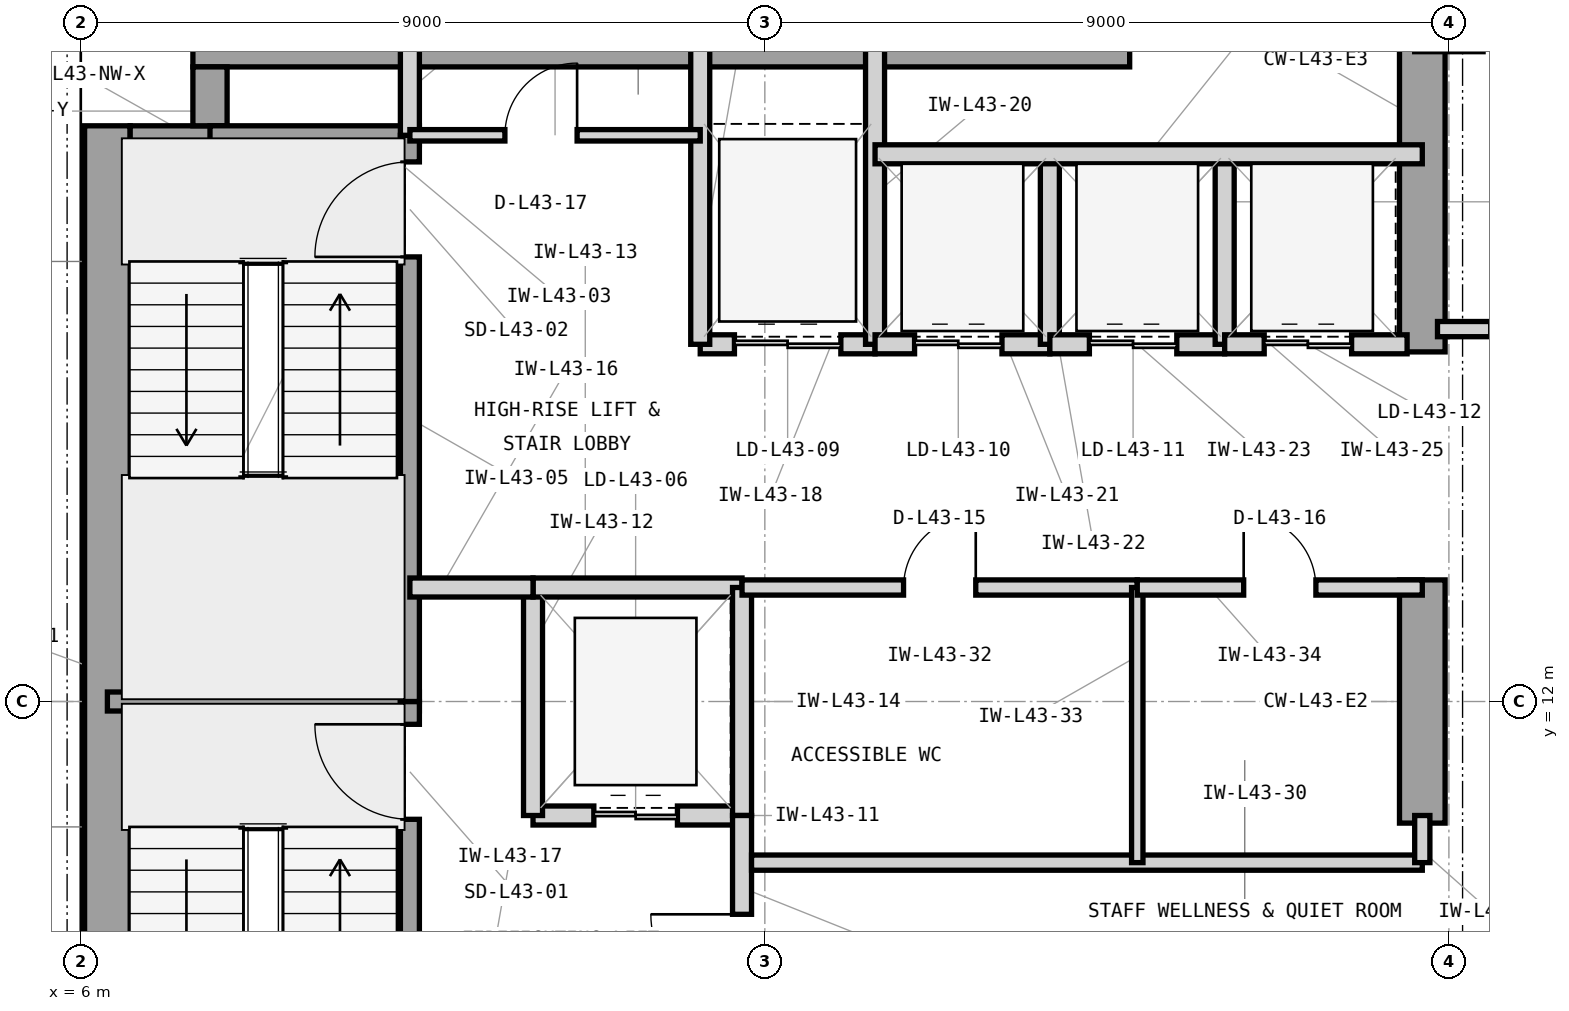
"""IFC4 building model, lengths in metres.
Left out: names, types, materials, properties, quantities, classifications, styles, units other than length and angle.
Written with IfcOpenShell. Run it as: python <this file> out.ifc"""

import sys

from ifc_helpers import new_model, si_unit, direction, frame, frame_2d, origin, place, context, subcontext, project, spatial, rectangle, extrude, element, fill, save


model = new_model("IFC4")
c1 = context("Model", 3, precision=1e-05, world=origin(), true_north=direction((0.0, 1.0)))
c2 = subcontext(c1, "Body", "Model", "MODEL_VIEW")
j1 = project(units=[si_unit("LENGTHUNIT", "METRE"), si_unit("PLANEANGLEUNIT", "RADIAN")], contexts=[c1])
p1 = place(None, origin())
s1 = spatial("IfcSite", under=j1, at=p1, CompositionType="ELEMENT")
p2 = place(p1, origin())
s2 = spatial("IfcBuilding", under=s1, at=p2, CompositionType="ELEMENT")
p3 = place(p2, frame((0.0, 0.0, 180.0)))
s3 = spatial("IfcBuildingStorey", under=s2, at=p3, CompositionType="ELEMENT", Elevation=180.0)
p4 = place(p3, frame((6.35, 4.425, 0.0), z_axis=(0.0, 0.0, 1.0), x_axis=(0.0, 1.0, 0.0)))
e1 = element("IfcWall", 1, at=p4, inside=s3, PredefinedType="SHEAR", context=c2, shape_type="SweptSolid", body=[
    extrude(rectangle(XDim=15.15, YDim=0.6, at=frame_2d((7.575, 0.0))), origin(), (0.0, 0.0, 1.0), 3.9),
])
p5 = place(p3, frame((7.475, 20.65, 0.0), z_axis=(0.0, 0.0, 1.0), x_axis=(1.0, 0.0, 0.0)))
e2 = element("IfcWall", 2, at=p5, inside=s3, PredefinedType="SHEAR", context=c2, shape_type="SweptSolid", body=[
    extrude(rectangle(XDim=12.325, YDim=0.6, at=frame_2d((6.163, 0.0))), origin(), (0.0, 0.0, 1.0), 3.9),
])
p6 = place(p3, frame((23.65, 10.4, 0.0), z_axis=(0.0, 0.0, 1.0), x_axis=(0.0, 1.0, 0.0)))
e3 = element("IfcWall", 3, at=p6, inside=s3, PredefinedType="SHEAR", context=c2, shape_type="SweptSolid", body=[
    extrude(rectangle(XDim=3.2, YDim=0.6, at=frame_2d((1.6, 0.0))), origin(), (0.0, 0.0, 1.0), 3.9),
])
p7 = place(p3, frame((23.65, 16.6, 0.0), z_axis=(0.0, 0.0, 1.0), x_axis=(0.0, 1.0, 0.0)))
e4 = element("IfcWall", 4, at=p7, inside=s3, PredefinedType="SHEAR", context=c2, shape_type="SweptSolid", body=[
    extrude(rectangle(XDim=4.05, YDim=0.6, at=frame_2d((2.025, 0.0))), origin(), (0.0, 0.0, 1.0), 3.9),
])
p8 = place(p3, frame((6.65, 19.35, 0.0), z_axis=(0.0, 0.0, 1.0), x_axis=(1.0, 0.0, 0.0)))
e5 = element("IfcWall", 5, at=p8, inside=s3, PredefinedType="SHEAR", context=c2, shape_type="SweptSolid", body=[
    extrude(rectangle(XDim=1.275, YDim=0.45, at=frame_2d((0.638, 0.0))), origin(), (0.0, 0.0, 1.0), 3.9),
])
p9 = place(p3, frame((7.7, 19.575, 0.0), z_axis=(0.0, 0.0, 1.0), x_axis=(0.0, 1.0, 0.0)))
e6 = element("IfcWall", 6, at=p9, inside=s3, PredefinedType="SHEAR", context=c2, shape_type="SweptSolid", body=[
    extrude(rectangle(XDim=0.775, YDim=0.45, at=frame_2d((0.388, 0.0))), origin(), (0.0, 0.0, 1.0), 3.9),
])
p10 = place(p3, frame((6.35, 12.0, 0.0), z_axis=(0.0, 0.0, 1.0), x_axis=(1.0, 0.0, 0.0)))
e7 = element("IfcWall", 7, at=p10, inside=s3, PredefinedType="SHEAR", context=c2, shape_type="SweptSolid", body=[
    extrude(rectangle(XDim=4.105, YDim=0.25, at=frame_2d((2.052, 0.0))), origin(), (0.0, 0.0, 1.0), 3.9),
])
p11 = place(p3, frame((7.7, 19.45, 0.0), z_axis=(0.0, 0.0, 1.0), x_axis=(1.0, 0.0, 0.0)))
e8 = element("IfcWall", 8, at=p11, inside=s3, PredefinedType="SHEAR", context=c2, shape_type="SweptSolid", body=[
    extrude(rectangle(XDim=2.755, YDim=0.25, at=frame_2d((1.377, 0.0))), origin(), (0.0, 0.0, 1.0), 3.9),
])
p12 = place(p3, frame((10.33, 4.55, 0.0), z_axis=(0.0, 0.0, 1.0), x_axis=(0.0, 1.0, 0.0)))
e9 = element("IfcWall", 9, at=p12, inside=s3, PredefinedType="SHEAR", context=c2, shape_type="SweptSolid", body=[
    extrude(rectangle(XDim=7.45, YDim=0.25, at=frame_2d((3.725, 0.0))), origin(), (0.0, 0.0, 1.0), 3.9),
])
p13 = place(p12, frame((5.9, 0.0, 0.0)))
e10 = element("IfcOpeningElement", 10, at=p13, cuts=e9, PredefinedType="OPENING", context=c2, shape_type="SweptSolid", body=[
    extrude(rectangle(XDim=1.25, YDim=2.2, at=frame_2d((0.625, 1.1))), frame((0.0, 0.135, 0.0), z_axis=(0.0, -1.0, 0.0), x_axis=(1.0, 0.0, 0.0)), (0.0, 0.0, 1.0), 0.27),
])
p14 = place(p3, frame((10.33, 12.0, 0.0), z_axis=(0.0, 0.0, 1.0), x_axis=(0.0, 1.0, 0.0)))
e11 = element("IfcWall", 11, at=p14, inside=s3, PredefinedType="SHEAR", context=c2, shape_type="SweptSolid", body=[
    extrude(rectangle(XDim=7.45, YDim=0.25, at=frame_2d((3.725, 0.0))), origin(), (0.0, 0.0, 1.0), 3.9),
])
p15 = place(p14, frame((5.85, 0.0, 0.0)))
e12 = element("IfcOpeningElement", 12, at=p15, cuts=e11, PredefinedType="OPENING", context=c2, shape_type="SweptSolid", body=[
    extrude(rectangle(XDim=1.25, YDim=2.2, at=frame_2d((0.625, 1.1))), frame((0.0, 0.135, 0.0), z_axis=(0.0, -1.0, 0.0), x_axis=(1.0, 0.0, 0.0)), (0.0, 0.0, 1.0), 0.27),
])
p16 = place(p3, frame((10.33, 19.45, 0.0), z_axis=(0.0, 0.0, 1.0), x_axis=(0.0, 1.0, 0.0)))
e13 = element("IfcWall", 13, at=p16, inside=s3, PredefinedType="PARTITIONING", context=c2, shape_type="SweptSolid", body=[
    extrude(rectangle(XDim=1.2, YDim=0.25, at=frame_2d((0.6, 0.0))), origin(), (0.0, 0.0, 1.0), 3.073),
])
p17 = place(p3, frame((11.95, 10.5, 0.0), z_axis=(0.0, 0.0, 1.0), x_axis=(1.0, 0.0, 0.0)))
e14 = element("IfcWall", 14, at=p17, inside=s3, PredefinedType="PARTITIONING", context=c2, shape_type="SweptSolid", body=[
    extrude(rectangle(XDim=2.75, YDim=0.25, at=frame_2d((1.375, 0.0))), origin(), (0.0, 0.0, 1.0), 3.283),
])
p18 = place(p17, frame((0.8, 0.0, 0.0)))
e15 = element("IfcOpeningElement", 15, at=p18, cuts=e14, PredefinedType="OPENING", context=c2, shape_type="SweptSolid", body=[
    extrude(rectangle(XDim=1.1, YDim=2.25, at=frame_2d((0.55, 1.125))), frame((0.0, 0.135, 0.0), z_axis=(0.0, -1.0, 0.0), x_axis=(1.0, 0.0, 0.0)), (0.0, 0.0, 1.0), 0.27),
])
p19 = place(p3, frame((11.95, 10.5, 0.0), z_axis=(0.0, 0.0, 1.0), x_axis=(0.0, 1.0, 0.0)))
e16 = element("IfcWall", 16, at=p19, inside=s3, PredefinedType="PARTITIONING", context=c2, shape_type="SweptSolid", body=[
    extrude(rectangle(XDim=3.0, YDim=0.25, at=frame_2d((1.5, 0.0))), origin(), (0.0, 0.0, 1.0), 3.69),
])
p20 = place(p3, frame((11.95, 13.5, 0.0), z_axis=(0.0, 0.0, 1.0), x_axis=(1.0, 0.0, 0.0)))
e17 = element("IfcWall", 17, at=p20, inside=s3, PredefinedType="PARTITIONING", context=c2, shape_type="SweptSolid", body=[
    extrude(rectangle(XDim=2.75, YDim=0.25, at=frame_2d((1.375, 0.0))), origin(), (0.0, 0.0, 1.0), 3.283),
])
p21 = place(p3, frame((14.7, 10.5, 0.0), z_axis=(0.0, 0.0, 1.0), x_axis=(0.0, 1.0, 0.0)))
e18 = element("IfcWall", 18, at=p21, inside=s3, PredefinedType="PARTITIONING", context=c2, shape_type="SweptSolid", body=[
    extrude(rectangle(XDim=3.0, YDim=0.25, at=frame_2d((1.5, 0.0))), origin(), (0.0, 0.0, 1.0), 3.69),
])
p22 = place(p3, frame((14.7, 6.7, 0.0), z_axis=(0.0, 0.0, 1.0), x_axis=(0.0, 1.0, 0.0)))
e19 = element("IfcWall", 19, at=p22, inside=s3, PredefinedType="PARTITIONING", context=c2, shape_type="SweptSolid", body=[
    extrude(rectangle(XDim=3.8, YDim=0.25, at=frame_2d((1.9, 0.0))), origin(), (0.0, 0.0, 1.0), 3.69),
])
p23 = place(p22, frame((1.3, 0.0, 0.0)))
e20 = element("IfcOpeningElement", 20, at=p23, cuts=e19, PredefinedType="OPENING", context=c2, shape_type="SweptSolid", body=[
    extrude(rectangle(XDim=1.2, YDim=2.2, at=frame_2d((0.6, 1.1))), frame((0.0, 0.135, 0.0), z_axis=(0.0, -1.0, 0.0), x_axis=(1.0, 0.0, 0.0)), (0.0, 0.0, 1.0), 0.27),
])
p24 = place(p3, frame((10.33, 13.5, 0.0), z_axis=(0.0, 0.0, 1.0), x_axis=(1.0, 0.0, 0.0)))
e21 = element("IfcWall", 21, at=p24, inside=s3, PredefinedType="PARTITIONING", context=c2, shape_type="SweptSolid", body=[
    extrude(rectangle(XDim=1.62, YDim=0.25, at=frame_2d((0.81, 0.0))), origin(), (0.0, 0.0, 1.0), 3.283),
])
p25 = place(p3, frame((14.15, 16.7, 0.0), z_axis=(0.0, 0.0, 1.0), x_axis=(1.0, 0.0, 0.0)))
e22 = element("IfcWall", 22, at=p25, inside=s3, PredefinedType="PARTITIONING", context=c2, shape_type="SweptSolid", body=[
    extrude(rectangle(XDim=2.3, YDim=0.25, at=frame_2d((1.15, 0.0))), origin(), (0.0, 0.0, 1.0), 3.283),
])
p26 = place(p25, frame((0.45, 0.0, 0.0)))
e23 = element("IfcOpeningElement", 23, at=p26, cuts=e22, PredefinedType="OPENING", context=c2, shape_type="SweptSolid", body=[
    extrude(rectangle(XDim=1.4, YDim=2.35, at=frame_2d((0.7, 1.175))), frame((0.0, 0.135, 0.0), z_axis=(0.0, -1.0, 0.0), x_axis=(1.0, 0.0, 0.0)), (0.0, 0.0, 1.0), 0.27),
])
for number, where, z_axis, x_axis in (
    (24, (14.15, 16.7, 0.0), (0.0, 0.0, 1.0), (0.0, 1.0, 0.0)),
    (25, (16.45, 16.7, 0.0), (0.0, 0.0, 1.0), (0.0, 1.0, 0.0)),
):
    element("IfcWall", number, at=place(p3, frame(where, z_axis=z_axis, x_axis=x_axis)), inside=s3, PredefinedType="PARTITIONING", context=c2, shape_type="SweptSolid", body=[
        extrude(rectangle(XDim=3.95, YDim=0.25, at=frame_2d((1.975, 0.0))), origin(), (0.0, 0.0, 1.0), 3.69),
    ])
p27 = place(p3, frame((16.45, 16.7, 0.0), z_axis=(0.0, 0.0, 1.0), x_axis=(1.0, 0.0, 0.0)))
e26 = element("IfcWall", 26, at=p27, inside=s3, PredefinedType="PARTITIONING", context=c2, shape_type="SweptSolid", body=[
    extrude(rectangle(XDim=2.3, YDim=0.25, at=frame_2d((1.15, 0.0))), origin(), (0.0, 0.0, 1.0), 3.283),
])
p28 = place(p27, frame((0.52, 0.0, 0.0)))
e27 = element("IfcOpeningElement", 27, at=p28, cuts=e26, PredefinedType="OPENING", context=c2, shape_type="SweptSolid", body=[
    extrude(rectangle(XDim=1.15, YDim=2.25, at=frame_2d((0.575, 1.125))), frame((0.0, 0.135, 0.0), z_axis=(0.0, -1.0, 0.0), x_axis=(1.0, 0.0, 0.0)), (0.0, 0.0, 1.0), 0.27),
])
p29 = place(p3, frame((18.75, 16.7, 0.0), z_axis=(0.0, 0.0, 1.0), x_axis=(0.0, 1.0, 0.0)))
e28 = element("IfcWall", 28, at=p29, inside=s3, PredefinedType="PARTITIONING", context=c2, shape_type="SweptSolid", body=[
    extrude(rectangle(XDim=2.5, YDim=0.25, at=frame_2d((1.25, 0.0))), origin(), (0.0, 0.0, 1.0), 3.69),
])
p30 = place(p3, frame((18.75, 16.7, 0.0), z_axis=(0.0, 0.0, 1.0), x_axis=(1.0, 0.0, 0.0)))
e29 = element("IfcWall", 29, at=p30, inside=s3, PredefinedType="PARTITIONING", context=c2, shape_type="SweptSolid", body=[
    extrude(rectangle(XDim=2.3, YDim=0.25, at=frame_2d((1.15, 0.0))), origin(), (0.0, 0.0, 1.0), 3.283),
])
p31 = place(p30, frame((0.52, 0.0, 0.0)))
e30 = element("IfcOpeningElement", 30, at=p31, cuts=e29, PredefinedType="OPENING", context=c2, shape_type="SweptSolid", body=[
    extrude(rectangle(XDim=1.15, YDim=2.25, at=frame_2d((0.575, 1.125))), frame((0.0, 0.135, 0.0), z_axis=(0.0, -1.0, 0.0), x_axis=(1.0, 0.0, 0.0)), (0.0, 0.0, 1.0), 0.27),
])
p32 = place(p3, frame((21.05, 16.7, 0.0), z_axis=(0.0, 0.0, 1.0), x_axis=(0.0, 1.0, 0.0)))
e31 = element("IfcWall", 31, at=p32, inside=s3, PredefinedType="PARTITIONING", context=c2, shape_type="SweptSolid", body=[
    extrude(rectangle(XDim=2.5, YDim=0.25, at=frame_2d((1.25, 0.0))), origin(), (0.0, 0.0, 1.0), 3.69),
])
p33 = place(p3, frame((21.05, 16.7, 0.0), z_axis=(0.0, 0.0, 1.0), x_axis=(1.0, 0.0, 0.0)))
e32 = element("IfcWall", 32, at=p33, inside=s3, PredefinedType="PARTITIONING", context=c2, shape_type="SweptSolid", body=[
    extrude(rectangle(XDim=2.4, YDim=0.25, at=frame_2d((1.2, 0.0))), origin(), (0.0, 0.0, 1.0), 3.283),
])
p34 = place(p33, frame((0.52, 0.0, 0.0)))
e33 = element("IfcOpeningElement", 33, at=p34, cuts=e32, PredefinedType="OPENING", context=c2, shape_type="SweptSolid", body=[
    extrude(rectangle(XDim=1.15, YDim=2.25, at=frame_2d((0.575, 1.125))), frame((0.0, 0.135, 0.0), z_axis=(0.0, -1.0, 0.0), x_axis=(1.0, 0.0, 0.0)), (0.0, 0.0, 1.0), 0.27),
])
p35 = place(p3, frame((16.45, 19.2, 0.0), z_axis=(0.0, 0.0, 1.0), x_axis=(1.0, 0.0, 0.0)))
e34 = element("IfcWall", 34, at=p35, inside=s3, PredefinedType="PARTITIONING", context=c2, shape_type="SweptSolid", body=[
    extrude(rectangle(XDim=7.2, YDim=0.25, at=frame_2d((3.6, 0.0))), origin(), (0.0, 0.0, 1.0), 3.69),
])
p36 = place(p3, frame((14.825, 9.88, 0.0), z_axis=(0.0, 0.0, 1.0), x_axis=(1.0, 0.0, 0.0)))
e35 = element("IfcWall", 35, at=p36, inside=s3, PredefinedType="PARTITIONING", context=c2, shape_type="SweptSolid", body=[
    extrude(rectangle(XDim=8.825, YDim=0.2, at=frame_2d((4.413, 0.0))), origin(), (0.0, 0.0, 1.0), 3.69),
])
p37 = place(p3, frame((23.65, 9.88, 0.0), z_axis=(0.0, 0.0, 1.0), x_axis=(0.0, 1.0, 0.0)))
e36 = element("IfcWall", 36, at=p37, inside=s3, PredefinedType="PARTITIONING", context=c2, shape_type="SweptSolid", body=[
    extrude(rectangle(XDim=0.62, YDim=0.2, at=frame_2d((0.31, 0.0))), origin(), (0.0, 0.0, 1.0), 3.69),
])
p38 = place(p3, frame((14.7, 13.5, 0.0), z_axis=(0.0, 0.0, 1.0), x_axis=(1.0, 0.0, 0.0)))
e37 = element("IfcWall", 37, at=p38, inside=s3, PredefinedType="PARTITIONING", context=c2, shape_type="SweptSolid", body=[
    extrude(rectangle(XDim=5.2, YDim=0.2, at=frame_2d((2.6, 0.0))), origin(), (0.0, 0.0, 1.0), 3.283),
])
p39 = place(p38, frame((2.125, 0.0, 0.0)))
e38 = element("IfcOpeningElement", 38, at=p39, cuts=e37, PredefinedType="OPENING", context=c2, shape_type="SweptSolid", body=[
    extrude(rectangle(XDim=0.95, YDim=2.1, at=frame_2d((0.475, 1.05))), frame((0.0, 0.11, 0.0), z_axis=(0.0, -1.0, 0.0), x_axis=(1.0, 0.0, 0.0)), (0.0, 0.0, 1.0), 0.22),
])
p40 = place(p3, frame((19.9, 9.88, 0.0), z_axis=(0.0, 0.0, 1.0), x_axis=(0.0, 1.0, 0.0)))
e39 = element("IfcWall", 39, at=p40, inside=s3, PredefinedType="PARTITIONING", context=c2, shape_type="SweptSolid", body=[
    extrude(rectangle(XDim=3.62, YDim=0.15, at=frame_2d((1.81, 0.0))), origin(), (0.0, 0.0, 1.0), 3.69),
])
p41 = place(p3, frame((19.9, 13.5, 0.0), z_axis=(0.0, 0.0, 1.0), x_axis=(1.0, 0.0, 0.0)))
e40 = element("IfcWall", 40, at=p41, inside=s3, PredefinedType="PARTITIONING", context=c2, shape_type="SweptSolid", body=[
    extrude(rectangle(XDim=3.75, YDim=0.2, at=frame_2d((1.875, 0.0))), origin(), (0.0, 0.0, 1.0), 3.283),
])
p42 = place(p41, frame((1.4, 0.0, 0.0)))
e41 = element("IfcOpeningElement", 41, at=p42, cuts=e40, PredefinedType="OPENING", context=c2, shape_type="SweptSolid", body=[
    extrude(rectangle(XDim=0.95, YDim=2.1, at=frame_2d((0.475, 1.05))), frame((0.0, 0.11, 0.0), z_axis=(0.0, -1.0, 0.0), x_axis=(1.0, 0.0, 0.0)), (0.0, 0.0, 1.0), 0.22),
])
p43 = place(p3, frame((10.33, 19.45, 0.0), z_axis=(0.0, 0.0, 1.0), x_axis=(1.0, 0.0, 0.0)))
e42 = element("IfcWall", 42, at=p43, inside=s3, PredefinedType="PARTITIONING", context=c2, shape_type="SweptSolid", body=[
    extrude(rectangle(XDim=3.82, YDim=0.15, at=frame_2d((1.91, 0.0))), origin(), (0.0, 0.0, 1.0), 3.69),
])
p44 = place(p43, frame((1.25, 0.0, 0.0)))
e43 = element("IfcOpeningElement", 43, at=p44, cuts=e42, PredefinedType="OPENING", context=c2, shape_type="SweptSolid", body=[
    extrude(rectangle(XDim=0.95, YDim=2.1, at=frame_2d((0.475, 1.05))), frame((0.0, 0.085, 0.0), z_axis=(0.0, -1.0, 0.0), x_axis=(1.0, 0.0, 0.0)), (0.0, 0.0, 1.0), 0.17),
])
p45 = place(p3, frame((23.85, 16.9, 0.0), z_axis=(0.0, 0.0, 1.0), x_axis=(1.0, 0.0, 0.0)))
e44 = element("IfcWall", 44, at=p45, inside=s3, PredefinedType="PARTITIONING", context=c2, shape_type="SweptSolid", body=[
    extrude(rectangle(XDim=2.85, YDim=0.2, at=frame_2d((1.425, 0.0))), origin(), (0.0, 0.0, 1.0), 3.69),
])
p46 = place(p45, frame((0.7, 0.0, 0.0)))
e45 = element("IfcOpeningElement", 45, at=p46, cuts=e44, PredefinedType="OPENING", context=c2, shape_type="SweptSolid", body=[
    extrude(rectangle(XDim=1.0, YDim=2.15, at=frame_2d((0.5, 1.075))), frame((0.0, 0.11, 0.0), z_axis=(0.0, -1.0, 0.0), x_axis=(1.0, 0.0, 0.0)), (0.0, 0.0, 1.0), 0.22),
])
p47 = place(p13, origin())
e46 = element("IfcDoor", 46, at=p47, inside=s3, OperationType="SINGLE_SWING_RIGHT", PredefinedType="DOOR", context=c2, shape_type="SweptSolid", body=[
    extrude(rectangle(XDim=1.25, YDim=2.2, at=frame_2d((0.625, 1.1))), frame((0.0, 0.025, 0.0), z_axis=(0.0, -1.0, 0.0), x_axis=(1.0, 0.0, 0.0)), (0.0, 0.0, 1.0), 0.05),
])
fill(e10, e46)
p48 = place(p15, origin())
e47 = element("IfcDoor", 47, at=p48, inside=s3, OperationType="SINGLE_SWING_LEFT", PredefinedType="DOOR", context=c2, shape_type="SweptSolid", body=[
    extrude(rectangle(XDim=1.25, YDim=2.2, at=frame_2d((0.625, 1.1))), frame((0.0, 0.025, 0.0), z_axis=(0.0, -1.0, 0.0), x_axis=(1.0, 0.0, 0.0)), (0.0, 0.0, 1.0), 0.05),
])
fill(e12, e47)
p49 = place(p18, origin())
e48 = element("IfcDoor", 48, at=p49, inside=s3, OperationType="DOUBLE_DOOR_SLIDING", PredefinedType="DOOR", context=c2, shape_type="SweptSolid", body=[
    extrude(rectangle(XDim=1.1, YDim=2.25, at=frame_2d((0.55, 1.125))), frame((0.0, 0.025, 0.0), z_axis=(0.0, -1.0, 0.0), x_axis=(1.0, 0.0, 0.0)), (0.0, 0.0, 1.0), 0.05),
])
fill(e15, e48)
p50 = place(p23, origin())
e49 = element("IfcDoor", 49, at=p50, inside=s3, OperationType="SINGLE_SWING_RIGHT", PredefinedType="DOOR", context=c2, shape_type="SweptSolid", body=[
    extrude(rectangle(XDim=1.2, YDim=2.2, at=frame_2d((0.6, 1.1))), frame((0.0, 0.025, 0.0), z_axis=(0.0, -1.0, 0.0), x_axis=(1.0, 0.0, 0.0)), (0.0, 0.0, 1.0), 0.05),
])
fill(e20, e49)
p51 = place(p26, origin())
e50 = element("IfcDoor", 50, at=p51, inside=s3, OperationType="DOUBLE_DOOR_SLIDING", PredefinedType="DOOR", context=c2, shape_type="SweptSolid", body=[
    extrude(rectangle(XDim=1.4, YDim=2.35, at=frame_2d((0.7, 1.175))), frame((0.0, 0.025, 0.0), z_axis=(0.0, -1.0, 0.0), x_axis=(1.0, 0.0, 0.0)), (0.0, 0.0, 1.0), 0.05),
])
fill(e23, e50)
p52 = place(p28, origin())
e51 = element("IfcDoor", 51, at=p52, inside=s3, OperationType="DOUBLE_DOOR_SLIDING", PredefinedType="DOOR", context=c2, shape_type="SweptSolid", body=[
    extrude(rectangle(XDim=1.15, YDim=2.25, at=frame_2d((0.575, 1.125))), frame((0.0, 0.025, 0.0), z_axis=(0.0, -1.0, 0.0), x_axis=(1.0, 0.0, 0.0)), (0.0, 0.0, 1.0), 0.05),
])
fill(e27, e51)
p53 = place(p31, origin())
e52 = element("IfcDoor", 52, at=p53, inside=s3, OperationType="DOUBLE_DOOR_SLIDING", PredefinedType="DOOR", context=c2, shape_type="SweptSolid", body=[
    extrude(rectangle(XDim=1.15, YDim=2.25, at=frame_2d((0.575, 1.125))), frame((0.0, 0.025, 0.0), z_axis=(0.0, -1.0, 0.0), x_axis=(1.0, 0.0, 0.0)), (0.0, 0.0, 1.0), 0.05),
])
fill(e30, e52)
p54 = place(p34, origin())
e53 = element("IfcDoor", 53, at=p54, inside=s3, OperationType="DOUBLE_DOOR_SLIDING", PredefinedType="DOOR", context=c2, shape_type="SweptSolid", body=[
    extrude(rectangle(XDim=1.15, YDim=2.25, at=frame_2d((0.575, 1.125))), frame((0.0, 0.025, 0.0), z_axis=(0.0, -1.0, 0.0), x_axis=(1.0, 0.0, 0.0)), (0.0, 0.0, 1.0), 0.05),
])
fill(e33, e53)
p55 = place(p39, origin())
e54 = element("IfcDoor", 54, at=p55, inside=s3, OperationType="SINGLE_SWING_RIGHT", PredefinedType="DOOR", context=c2, shape_type="SweptSolid", body=[
    extrude(rectangle(XDim=0.95, YDim=2.1, at=frame_2d((0.475, 1.05))), frame((0.0, 0.025, 0.0), z_axis=(0.0, -1.0, 0.0), x_axis=(1.0, 0.0, 0.0)), (0.0, 0.0, 1.0), 0.05),
])
fill(e38, e54)
p56 = place(p42, origin())
e55 = element("IfcDoor", 55, at=p56, inside=s3, OperationType="SINGLE_SWING_LEFT", PredefinedType="DOOR", context=c2, shape_type="SweptSolid", body=[
    extrude(rectangle(XDim=0.95, YDim=2.1, at=frame_2d((0.475, 1.05))), frame((0.0, 0.025, 0.0), z_axis=(0.0, -1.0, 0.0), x_axis=(1.0, 0.0, 0.0)), (0.0, 0.0, 1.0), 0.05),
])
fill(e41, e55)
p57 = place(p44, origin())
e56 = element("IfcDoor", 56, at=p57, inside=s3, OperationType="SINGLE_SWING_RIGHT", PredefinedType="DOOR", context=c2, shape_type="SweptSolid", body=[
    extrude(rectangle(XDim=0.95, YDim=2.1, at=frame_2d((0.475, 1.05))), frame((0.0, 0.025, 0.0), z_axis=(0.0, -1.0, 0.0), x_axis=(1.0, 0.0, 0.0)), (0.0, 0.0, 1.0), 0.05),
])
fill(e43, e56)
save(model, sys.argv[1])
